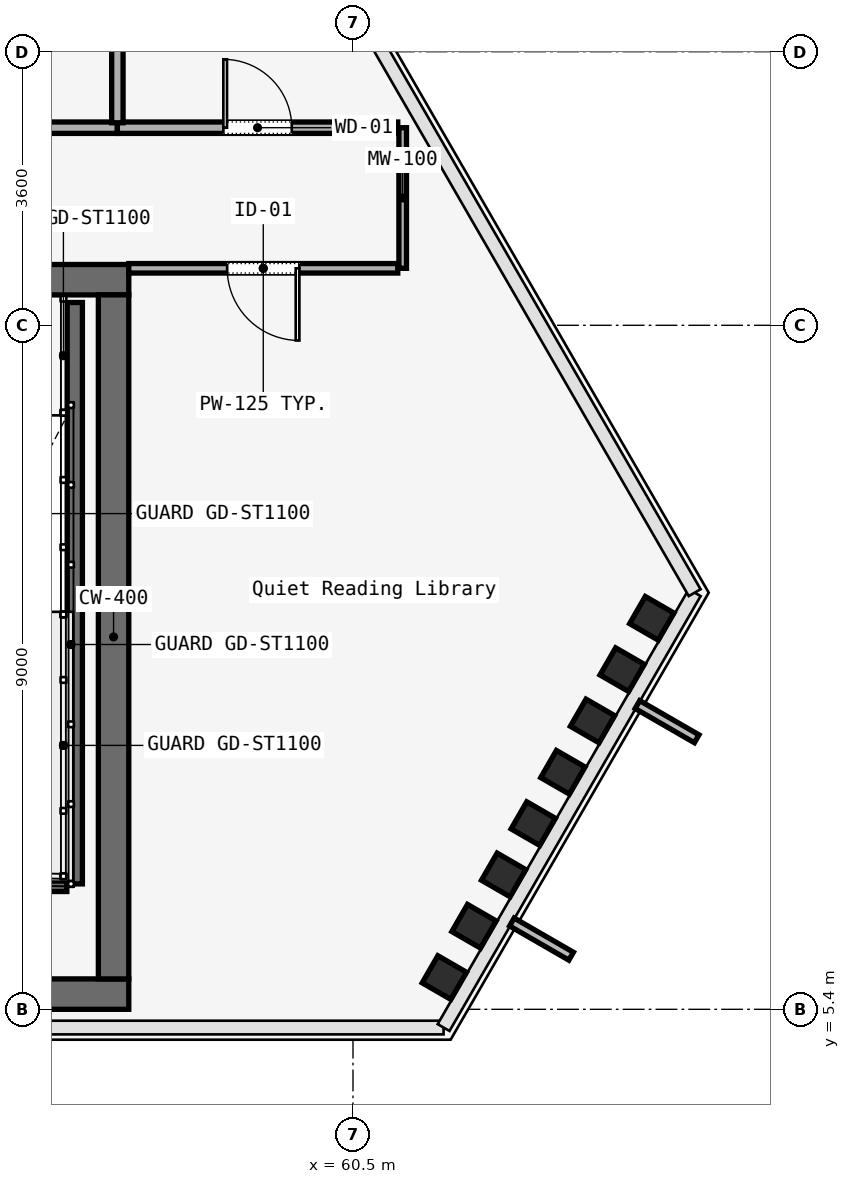
"""IFC4 building model, lengths in metres.
Left out: names, types, materials, properties, quantities, classifications, styles, units other than length and angle.
Written with IfcOpenShell. Run it as: python <this file> out.ifc"""

import sys

from ifc_helpers import new_model, si_unit, direction, frame, frame_2d, origin, origin_2d, place, context, subcontext, project, spatial, rectangle, i_section, extrude, element, fill, save


model = new_model("IFC4")
c1 = context("Model", 3, precision=1e-05, world=origin(), true_north=direction((0.0, 1.0)))
c2 = subcontext(c1, "Body", "Model", "MODEL_VIEW")
j1 = project(units=[si_unit("LENGTHUNIT", "METRE"), si_unit("PLANEANGLEUNIT", "RADIAN")], contexts=[c1])
p1 = place(None, origin())
s1 = spatial("IfcSite", under=j1, at=p1, CompositionType="ELEMENT")
p2 = place(p1, origin())
s2 = spatial("IfcBuilding", under=s1, at=p2, CompositionType="ELEMENT")
p3 = place(p2, frame((0.0, 0.0, 244.6)))
s3 = spatial("IfcBuildingStorey", under=s2, at=p3, CompositionType="ELEMENT", Elevation=244.6)
p4 = place(p3, frame((26.45, 15.0, 0.0), z_axis=(0.0, 0.0, 1.0), x_axis=(1.0, 0.0, 0.0)))
e1 = element("IfcWall", 1, at=p4, inside=s3, PredefinedType="SOLIDWALL", context=c2, shape_type="SweptSolid", body=[
    extrude(rectangle(XDim=31.1, YDim=0.4, at=frame_2d((15.55, 0.0))), origin(), (0.0, 0.0, 1.0), 3.58),
])
p5 = place(p4, frame((1.65, 0.0, 0.0)))
e2 = element("IfcOpeningElement", 2, at=p5, cuts=e1, PredefinedType="OPENING", context=c2, shape_type="SweptSolid", body=[
    extrude(rectangle(XDim=1.1, YDim=2.2, at=frame_2d((0.55, 1.1))), frame((0.0, 0.2, 0.0), z_axis=(0.0, -1.0, 0.0), x_axis=(1.0, 0.0, 0.0)), (0.0, 0.0, 1.0), 0.4),
])
p6 = place(p4, frame((13.65, 0.0, 0.0)))
e3 = element("IfcOpeningElement", 3, at=p6, cuts=e1, PredefinedType="OPENING", context=c2, shape_type="SweptSolid", body=[
    extrude(rectangle(XDim=1.1, YDim=2.2, at=frame_2d((0.55, 1.1))), frame((0.0, 0.2, 0.0), z_axis=(0.0, -1.0, 0.0), x_axis=(1.0, 0.0, 0.0)), (0.0, 0.0, 1.0), 0.4),
])
p7 = place(p4, frame((25.55, 0.0, 0.0)))
e4 = element("IfcOpeningElement", 4, at=p7, cuts=e1, PredefinedType="OPENING", context=c2, shape_type="SweptSolid", body=[
    extrude(rectangle(XDim=1.1, YDim=2.2, at=frame_2d((0.55, 1.1))), frame((0.0, 0.2, 0.0), z_axis=(0.0, -1.0, 0.0), x_axis=(1.0, 0.0, 0.0)), (0.0, 0.0, 1.0), 0.4),
])
p8 = place(p4, frame((19.35, 0.0, 0.0)))
e5 = element("IfcOpeningElement", 5, at=p8, cuts=e1, PredefinedType="OPENING", context=c2, shape_type="SweptSolid", body=[
    extrude(rectangle(XDim=1.1, YDim=2.2, at=frame_2d((0.55, 1.1))), frame((0.0, 0.2, 0.0), z_axis=(0.0, -1.0, 0.0), x_axis=(1.0, 0.0, 0.0)), (0.0, 0.0, 1.0), 0.4),
])
p9 = place(p4, frame((21.4, 0.0, 0.0)))
e6 = element("IfcOpeningElement", 6, at=p9, cuts=e1, PredefinedType="OPENING", context=c2, shape_type="SweptSolid", body=[
    extrude(rectangle(XDim=0.9, YDim=2.1, at=frame_2d((0.45, 1.05))), frame((0.0, 0.2, 0.0), z_axis=(0.0, -1.0, 0.0), x_axis=(1.0, 0.0, 0.0)), (0.0, 0.0, 1.0), 0.4),
])
p10 = place(p4, frame((5.54, 0.0, 0.0)))
e7 = element("IfcOpeningElement", 7, at=p10, cuts=e1, PredefinedType="OPENING", context=c2, shape_type="SweptSolid", body=[
    extrude(rectangle(XDim=0.95, YDim=2.2, at=frame_2d((0.475, 1.1))), frame((0.0, 0.2, 0.0), z_axis=(0.0, -1.0, 0.0), x_axis=(1.0, 0.0, 0.0)), (0.0, 0.0, 1.0), 0.4),
])
p11 = place(p4, frame((9.49, 0.0, 0.0)))
e8 = element("IfcOpeningElement", 8, at=p11, cuts=e1, PredefinedType="OPENING", context=c2, shape_type="SweptSolid", body=[
    extrude(rectangle(XDim=0.95, YDim=2.2, at=frame_2d((0.475, 1.1))), frame((0.0, 0.2, 0.0), z_axis=(0.0, -1.0, 0.0), x_axis=(1.0, 0.0, 0.0)), (0.0, 0.0, 1.0), 0.4),
])
p12 = place(p4, frame((23.35, 0.0, 0.0)))
e9 = element("IfcOpeningElement", 9, at=p12, cuts=e1, PredefinedType="OPENING", context=c2, shape_type="SweptSolid", body=[
    extrude(rectangle(XDim=1.3, YDim=2.3, at=frame_2d((0.65, 1.15))), frame((0.0, 0.2, 0.0), z_axis=(0.0, -1.0, 0.0), x_axis=(1.0, 0.0, 0.0)), (0.0, 0.0, 1.0), 0.4),
])
p13 = place(p3, frame((26.45, 5.6, 0.0), z_axis=(0.0, 0.0, 1.0), x_axis=(1.0, 0.0, 0.0)))
e10 = element("IfcWall", 10, at=p13, inside=s3, PredefinedType="SOLIDWALL", context=c2, shape_type="SweptSolid", body=[
    extrude(rectangle(XDim=31.1, YDim=0.4, at=frame_2d((15.55, 0.0))), origin(), (0.0, 0.0, 1.0), 3.58),
])
p14 = place(p3, frame((57.35, 5.8, 0.0), z_axis=(0.0, 0.0, 1.0), x_axis=(0.0, 1.0, 0.0)))
e11 = element("IfcWall", 11, at=p14, inside=s3, PredefinedType="SOLIDWALL", context=c2, shape_type="SweptSolid", body=[
    extrude(rectangle(XDim=9.0, YDim=0.4, at=frame_2d((4.5, 0.0))), origin(), (0.0, 0.0, 1.0), 3.58),
])
for number, where, z_axis, x_axis in (
    (12, (61.702, 5.818, 0.0), (0.0, 0.0, 1.0), (0.5, 0.866, 0.0)),
    (13, (62.092, 6.493, 0.0), (0.0, 0.0, 1.0), (0.5, 0.866, 0.0)),
    (14, (62.482, 7.168, 0.0), (0.0, 0.0, 1.0), (0.5, 0.866, 0.0)),
    (15, (62.872, 7.844, 0.0), (0.0, 0.0, 1.0), (0.5, 0.866, 0.0)),
    (16, (63.262, 8.519, 0.0), (0.0, 0.0, 1.0), (0.5, 0.866, 0.0)),
    (17, (63.652, 9.194, 0.0), (0.0, 0.0, 1.0), (0.5, 0.866, 0.0)),
    (18, (64.041, 9.869, 0.0), (0.0, 0.0, 1.0), (0.5, 0.866, 0.0)),
    (19, (64.431, 10.544, 0.0), (0.0, 0.0, 1.0), (0.5, 0.866, 0.0)),
):
    element("IfcColumn", number, at=place(p3, frame(where, z_axis=z_axis, x_axis=x_axis)), inside=s3, PredefinedType="COLUMN", context=c2, shape_type="SweptSolid", body=[
        extrude(i_section(OverallWidth=0.412, OverallDepth=0.435, WebThickness=0.036, FlangeThickness=0.044, FilletRadius=0.015, at=origin_2d()), origin(), (0.0, 0.0, 1.0), 3.58),
    ])
p15 = place(p3, frame((56.84, 14.7, 0.0), z_axis=(0.0, 0.0, 1.0), x_axis=(0.0, -1.0, 0.0)))
e20 = element("IfcWall", 20, at=p15, inside=s3, PredefinedType="SOLIDWALL", context=c2, shape_type="SweptSolid", body=[
    extrude(rectangle(XDim=7.65, YDim=0.2, at=frame_2d((3.825, 0.0))), origin(), (0.0, 0.0, 1.0), 3.8),
])
p16 = place(p3, frame((53.62, 7.05, 0.0), z_axis=(0.0, 0.0, 1.0), x_axis=(1.0, 0.0, 0.0)))
e21 = element("IfcWall", 21, at=p16, inside=s3, PredefinedType="SOLIDWALL", context=c2, shape_type="SweptSolid", body=[
    extrude(rectangle(XDim=3.115, YDim=0.2, at=frame_2d((1.558, 0.0))), origin(), (0.0, 0.0, 1.0), 3.8),
])
p17 = place(p3, frame((61.154, 17.0, 0.0), z_axis=(0.0, 0.0, 1.0), x_axis=(0.0, -1.0, 0.0)))
e22 = element("IfcWall", 22, at=p17, inside=s3, PredefinedType="MOVABLE", context=c2, shape_type="SweptSolid", body=[
    extrude(rectangle(XDim=1.85, YDim=0.1, at=frame_2d((0.925, 0.0))), origin(), (0.0, 0.0, 1.0), 3.01),
])
p18 = place(p3, frame((61.089, 15.15, 0.0), z_axis=(0.0, 0.0, 1.0), x_axis=(-1.0, 0.0, 0.0)))
e23 = element("IfcWall", 23, at=p18, inside=s3, PredefinedType="PARTITIONING", context=c2, shape_type="SweptSolid", body=[
    extrude(rectangle(XDim=3.539, YDim=0.125, at=frame_2d((1.77, 0.0))), origin(), (0.0, 0.0, 1.0), 3.01),
])
p19 = place(p18, frame((1.294, 0.0, 0.0)))
e24 = element("IfcOpeningElement", 24, at=p19, cuts=e23, PredefinedType="OPENING", context=c2, shape_type="SweptSolid", body=[
    extrude(rectangle(XDim=0.95, YDim=2.2, at=frame_2d((0.475, 1.1))), frame((0.0, 0.062, 0.0), z_axis=(0.0, -1.0, 0.0), x_axis=(1.0, 0.0, 0.0)), (0.0, 0.0, 1.0), 0.125),
])
p20 = place(p3, frame((52.8, 17.0, 0.0), z_axis=(0.0, 0.0, 1.0), x_axis=(1.0, 0.0, 0.0)))
e25 = element("IfcWall", 25, at=p20, inside=s3, PredefinedType="PARTITIONING", context=c2, shape_type="SweptSolid", body=[
    extrude(rectangle(XDim=4.6, YDim=0.15, at=frame_2d((2.3, 0.0))), origin(), (0.0, 0.0, 1.0), 3.01),
])
p21 = place(p20, frame((1.825, 0.0, 0.0)))
e26 = element("IfcOpeningElement", 26, at=p21, cuts=e25, PredefinedType="OPENING", context=c2, shape_type="SweptSolid", body=[
    extrude(rectangle(XDim=0.95, YDim=2.2, at=frame_2d((0.475, 1.1))), frame((0.0, 0.075, 0.0), z_axis=(0.0, -1.0, 0.0), x_axis=(1.0, 0.0, 0.0)), (0.0, 0.0, 1.0), 0.15),
])
p22 = place(p3, frame((57.4, 17.0, 0.0), z_axis=(0.0, 0.0, 1.0), x_axis=(1.0, 0.0, 0.0)))
e27 = element("IfcWall", 27, at=p22, inside=s3, PredefinedType="PARTITIONING", context=c2, shape_type="SweptSolid", body=[
    extrude(rectangle(XDim=3.689, YDim=0.15, at=frame_2d((1.845, 0.0))), origin(), (0.0, 0.0, 1.0), 3.01),
])
p23 = place(p22, frame((1.395, 0.0, 0.0)))
e28 = element("IfcOpeningElement", 28, at=p23, cuts=e27, PredefinedType="OPENING", context=c2, shape_type="SweptSolid", body=[
    extrude(rectangle(XDim=0.9, YDim=2.15, at=frame_2d((0.45, 1.075))), frame((0.0, 0.075, 0.0), z_axis=(0.0, -1.0, 0.0), x_axis=(1.0, 0.0, 0.0)), (0.0, 0.0, 1.0), 0.15),
])
p24 = place(p3, frame((57.4, 17.065, 0.0), z_axis=(0.0, 0.0, 1.0), x_axis=(0.0, 1.0, 0.0)))
e29 = element("IfcWall", 29, at=p24, inside=s3, PredefinedType="PARTITIONING", context=c2, shape_type="SweptSolid", body=[
    extrude(rectangle(XDim=6.973, YDim=0.15, at=frame_2d((3.487, 0.0))), origin(), (0.0, 0.0, 1.0), 3.01),
])
p25 = place(p19, origin())
e30 = element("IfcDoor", 30, at=p25, inside=s3, OperationType="SINGLE_SWING_LEFT", PredefinedType="DOOR", context=c2, shape_type="SweptSolid", body=[
    extrude(rectangle(XDim=0.95, YDim=2.2, at=frame_2d((0.475, 1.1))), frame((0.0, 0.025, 0.0), z_axis=(0.0, -1.0, 0.0), x_axis=(1.0, 0.0, 0.0)), (0.0, 0.0, 1.0), 0.05),
])
fill(e24, e30)
p26 = place(p23, origin())
e31 = element("IfcDoor", 31, at=p26, inside=s3, OperationType="SINGLE_SWING_RIGHT", PredefinedType="DOOR", context=c2, shape_type="SweptSolid", body=[
    extrude(rectangle(XDim=0.9, YDim=2.15, at=frame_2d((0.45, 1.075))), frame((0.0, 0.025, 0.0), z_axis=(0.0, -1.0, 0.0), x_axis=(1.0, 0.0, 0.0)), (0.0, 0.0, 1.0), 0.05),
])
fill(e28, e31)
save(model, sys.argv[1])
